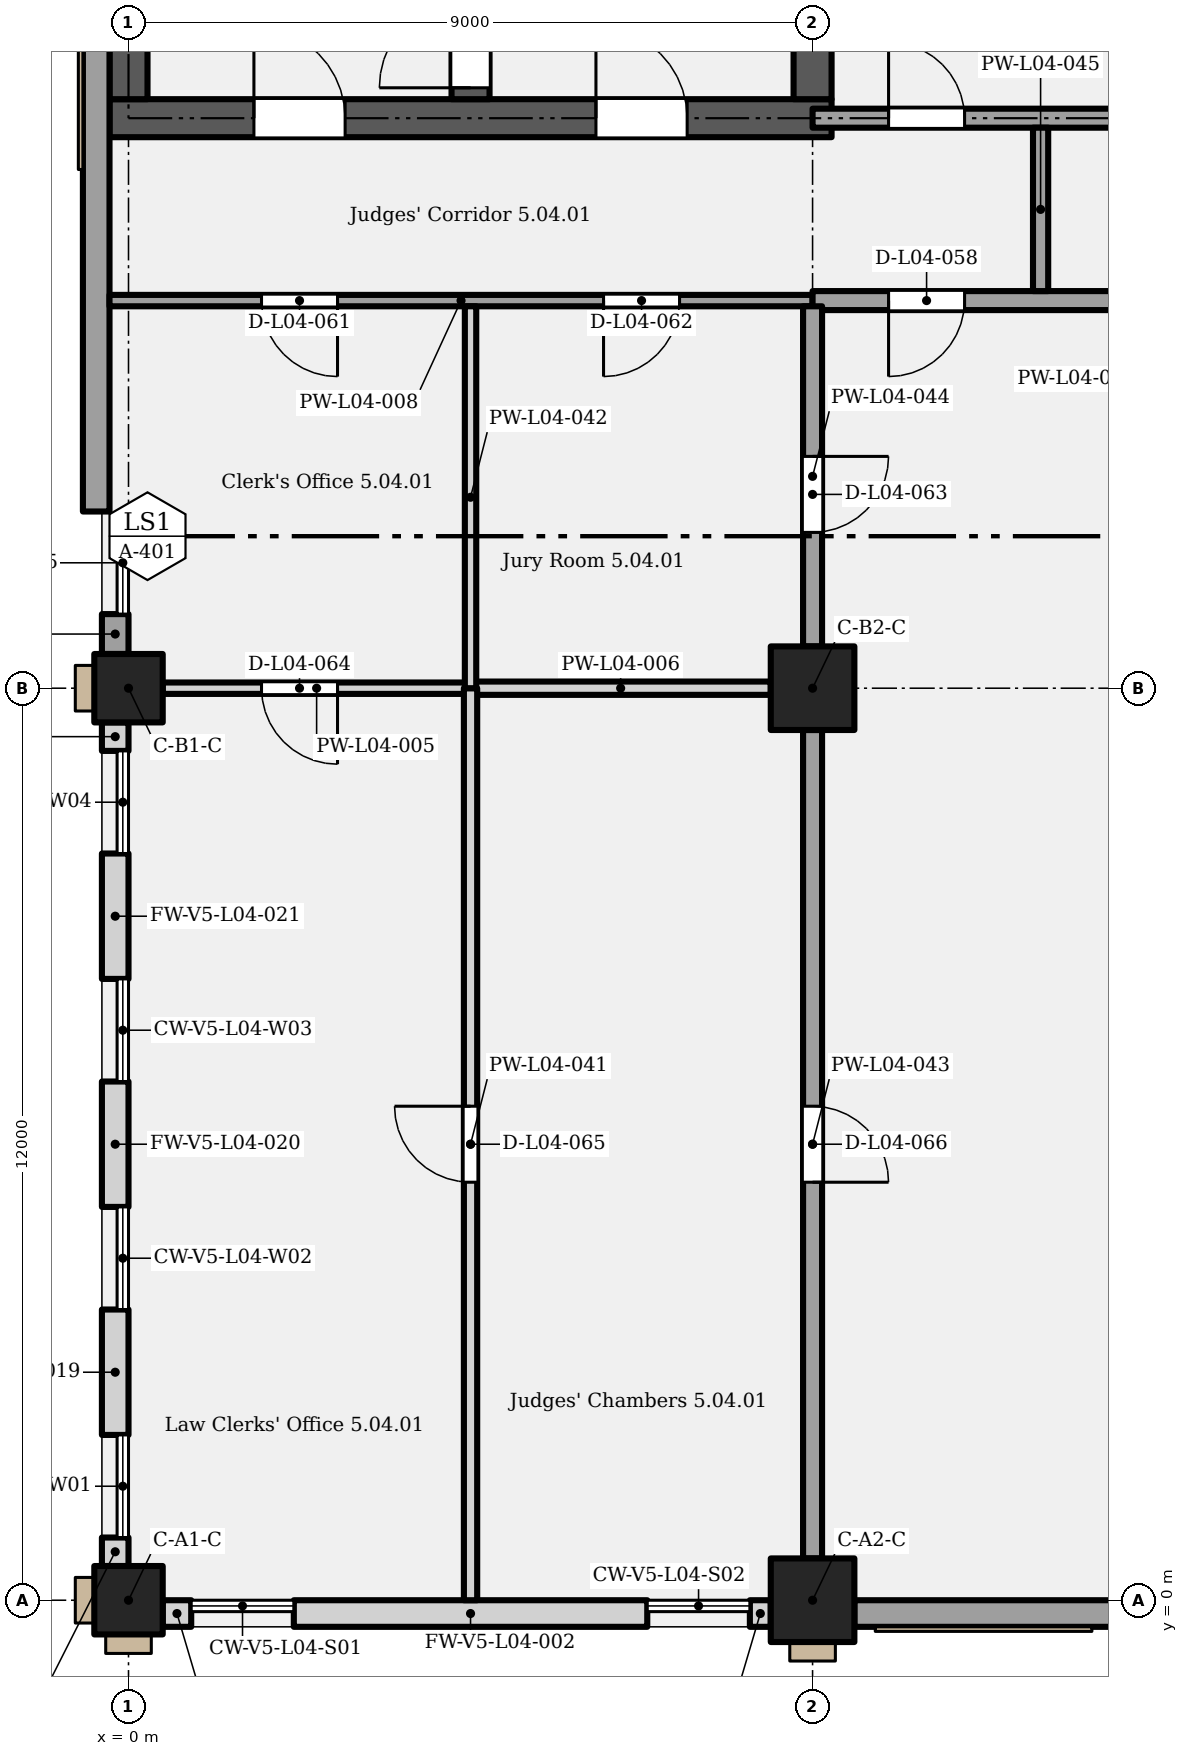
"""IFC4 building model, lengths in metres.
Left out: names, types, materials, properties, quantities, classifications, styles, units other than length and angle.
Written with IfcOpenShell. Run it as: python <this file> out.ifc"""

import sys

from ifc_helpers import new_model, si_unit, direction, frame, frame_2d, origin, origin_with_axes, origin_2d, place, context, subcontext, project, spatial, rectangle, extrude, element, fill, save


model = new_model("IFC4")
c1 = context("Model", 3, precision=1e-05, world=origin(), true_north=direction((0.0, 1.0)))
c2 = subcontext(c1, "Body", "Model", "MODEL_VIEW")
j1 = project(units=[si_unit("LENGTHUNIT", "METRE"), si_unit("PLANEANGLEUNIT", "RADIAN")], contexts=[c1])
p1 = place(None, origin())
s1 = spatial("IfcSite", under=j1, at=p1, CompositionType="ELEMENT")
p2 = place(p1, origin())
s2 = spatial("IfcBuilding", under=s1, at=p2, CompositionType="ELEMENT")
p3 = place(p2, frame((0.0, 0.0, 22.8)))
s3 = spatial("IfcBuildingStorey", under=s2, at=p3, CompositionType="ELEMENT", Elevation=22.8)
p4 = place(p3, origin_with_axes())
e1 = element("IfcColumn", 1, at=p4, inside=s3, PredefinedType="COLUMN", context=c2, shape_type="SweptSolid", body=[
    extrude(rectangle(XDim=0.9, YDim=0.9, at=origin_2d()), origin(), (0.0, 0.0, 1.0), 5.4),
])
p5 = place(p3, frame((9.0, 0.0, 0.0), z_axis=(0.0, 0.0, 1.0), x_axis=(1.0, 0.0, 0.0)))
e2 = element("IfcColumn", 2, at=p5, inside=s3, PredefinedType="COLUMN", context=c2, shape_type="SweptSolid", body=[
    extrude(rectangle(XDim=1.1, YDim=1.1, at=origin_2d()), origin(), (0.0, 0.0, 1.0), 5.4),
])
p6 = place(p3, frame((0.0, 12.0, 0.0), z_axis=(0.0, 0.0, 1.0), x_axis=(1.0, 0.0, 0.0)))
e3 = element("IfcColumn", 3, at=p6, inside=s3, PredefinedType="COLUMN", context=c2, shape_type="SweptSolid", body=[
    extrude(rectangle(XDim=0.9, YDim=0.9, at=origin_2d()), origin(), (0.0, 0.0, 1.0), 5.4),
])
p7 = place(p3, frame((9.0, 12.0, 0.0), z_axis=(0.0, 0.0, 1.0), x_axis=(1.0, 0.0, 0.0)))
e4 = element("IfcColumn", 4, at=p7, inside=s3, PredefinedType="COLUMN", context=c2, shape_type="SweptSolid", body=[
    extrude(rectangle(XDim=1.1, YDim=1.1, at=origin_2d()), origin(), (0.0, 0.0, 1.0), 5.4),
])
p8 = place(p3, frame((-0.25, 19.5, 0.0), z_axis=(0.0, 0.0, 1.0), x_axis=(1.0, 0.0, 0.0)))
e5 = element("IfcWall", 5, at=p8, inside=s3, PredefinedType="SHEAR", context=c2, shape_type="SweptSolid", body=[
    extrude(rectangle(XDim=9.5, YDim=0.5, at=frame_2d((4.75, 0.0))), origin(), (0.0, 0.0, 1.0), 5.15),
])
p9 = place(p8, frame((1.9, 0.0, 0.0)))
e6 = element("IfcOpeningElement", 6, at=p9, cuts=e5, PredefinedType="OPENING", context=c2, shape_type="SweptSolid", body=[
    extrude(rectangle(XDim=1.2, YDim=2.1, at=frame_2d((0.6, 1.05))), frame((0.0, 0.26, 0.0), z_axis=(0.0, -1.0, 0.0), x_axis=(1.0, 0.0, 0.0)), (0.0, 0.0, 1.0), 0.52),
])
p10 = place(p8, frame((6.4, 0.0, 0.0)))
e7 = element("IfcOpeningElement", 7, at=p10, cuts=e5, PredefinedType="OPENING", context=c2, shape_type="SweptSolid", body=[
    extrude(rectangle(XDim=1.2, YDim=2.1, at=frame_2d((0.6, 1.05))), frame((0.0, 0.26, 0.0), z_axis=(0.0, -1.0, 0.0), x_axis=(1.0, 0.0, 0.0)), (0.0, 0.0, 1.0), 0.52),
])
p11 = place(p3, frame((0.0, 19.75, 0.0), z_axis=(0.0, 0.0, 1.0), x_axis=(0.0, 1.0, 0.0)))
e8 = element("IfcWall", 8, at=p11, inside=s3, PredefinedType="SHEAR", context=c2, shape_type="SweptSolid", body=[
    extrude(rectangle(XDim=8.3, YDim=0.5, at=frame_2d((4.15, 0.0))), origin(), (0.0, 0.0, 1.0), 5.15),
])
p12 = place(p3, frame((4.5, 19.75, 0.0), z_axis=(0.0, 0.0, 1.0), x_axis=(0.0, 1.0, 0.0)))
e9 = element("IfcWall", 9, at=p12, inside=s3, PredefinedType="SHEAR", context=c2, shape_type="SweptSolid", body=[
    extrude(rectangle(XDim=8.5, YDim=0.5, at=frame_2d((4.25, 0.0))), origin(), (0.0, 0.0, 1.0), 5.15),
])
p13 = place(p12, frame((0.15, 0.0, 0.0)))
e10 = element("IfcOpeningElement", 10, at=p13, cuts=e9, PredefinedType="OPENING", context=c2, shape_type="SweptSolid", body=[
    extrude(rectangle(XDim=1.2, YDim=2.1, at=frame_2d((0.6, 1.05))), frame((0.0, 0.26, 0.0), z_axis=(0.0, -1.0, 0.0), x_axis=(1.0, 0.0, 0.0)), (0.0, 0.0, 1.0), 0.52),
])
p14 = place(p3, frame((9.0, 19.75, 0.0), z_axis=(0.0, 0.0, 1.0), x_axis=(0.0, 1.0, 0.0)))
e11 = element("IfcWall", 11, at=p14, inside=s3, PredefinedType="SHEAR", context=c2, shape_type="SweptSolid", body=[
    extrude(rectangle(XDim=8.2, YDim=0.5, at=frame_2d((4.1, 0.0))), origin(), (0.0, 0.0, 1.0), 5.15),
])
p15 = place(p3, frame((0.45, -0.175, 0.0), z_axis=(0.0, 0.0, 1.0), x_axis=(1.0, 0.0, 0.0)))
e12 = element("IfcWall", 12, at=p15, inside=s3, PredefinedType="SOLIDWALL", context=c2, shape_type="SweptSolid", body=[
    extrude(rectangle(XDim=0.375, YDim=0.35, at=frame_2d((0.188, 0.0))), origin(), (0.0, 0.0, 1.0), 5.15),
])
p16 = place(p3, frame((2.175, -0.175, 0.0), z_axis=(0.0, 0.0, 1.0), x_axis=(1.0, 0.0, 0.0)))
e13 = element("IfcWall", 13, at=p16, inside=s3, PredefinedType="SOLIDWALL", context=c2, shape_type="SweptSolid", body=[
    extrude(rectangle(XDim=4.65, YDim=0.35, at=frame_2d((2.325, 0.0))), origin(), (0.0, 0.0, 1.0), 5.15),
])
p17 = place(p3, frame((8.175, -0.175, 0.0), z_axis=(0.0, 0.0, 1.0), x_axis=(1.0, 0.0, 0.0)))
e14 = element("IfcWall", 14, at=p17, inside=s3, PredefinedType="SOLIDWALL", context=c2, shape_type="SweptSolid", body=[
    extrude(rectangle(XDim=0.275, YDim=0.35, at=frame_2d((0.137, 0.0))), origin(), (0.0, 0.0, 1.0), 5.15),
])
p18 = place(p3, frame((9.55, -0.175, 0.0), z_axis=(0.0, 0.0, 1.0), x_axis=(1.0, 0.0, 0.0)))
e15 = element("IfcWall", 15, at=p18, inside=s3, PredefinedType="SOLIDWALL", context=c2, shape_type="SweptSolid", body=[
    extrude(rectangle(XDim=7.9, YDim=0.35, at=frame_2d((3.95, 0.0))), origin(), (0.0, 0.0, 1.0), 5.15),
])
p19 = place(p3, frame((-0.175, 0.45, 0.0), z_axis=(0.0, 0.0, 1.0), x_axis=(0.0, 1.0, 0.0)))
e16 = element("IfcWall", 16, at=p19, inside=s3, PredefinedType="SOLIDWALL", context=c2, shape_type="SweptSolid", body=[
    extrude(rectangle(XDim=0.375, YDim=0.35, at=frame_2d((0.188, 0.0))), origin(), (0.0, 0.0, 1.0), 5.15),
])
for number, where, z_axis, x_axis in (
    (17, (-0.175, 2.175, 0.0), (0.0, 0.0, 1.0), (0.0, 1.0, 0.0)),
    (18, (-0.175, 5.175, 0.0), (0.0, 0.0, 1.0), (0.0, 1.0, 0.0)),
    (19, (-0.175, 8.175, 0.0), (0.0, 0.0, 1.0), (0.0, 1.0, 0.0)),
):
    element("IfcWall", number, at=place(p3, frame(where, z_axis=z_axis, x_axis=x_axis)), inside=s3, PredefinedType="SOLIDWALL", context=c2, shape_type="SweptSolid", body=[
        extrude(rectangle(XDim=1.65, YDim=0.35, at=frame_2d((0.825, 0.0))), origin(), (0.0, 0.0, 1.0), 5.15),
    ])
p20 = place(p3, frame((-0.175, 11.175, 0.0), z_axis=(0.0, 0.0, 1.0), x_axis=(0.0, 1.0, 0.0)))
e20 = element("IfcWall", 20, at=p20, inside=s3, PredefinedType="SOLIDWALL", context=c2, shape_type="SweptSolid", body=[
    extrude(rectangle(XDim=0.375, YDim=0.35, at=frame_2d((0.188, 0.0))), origin(), (0.0, 0.0, 1.0), 5.15),
])
p21 = place(p3, frame((-0.175, 12.45, 0.0), z_axis=(0.0, 0.0, 1.0), x_axis=(0.0, 1.0, 0.0)))
e21 = element("IfcWall", 21, at=p21, inside=s3, PredefinedType="SOLIDWALL", context=c2, shape_type="SweptSolid", body=[
    extrude(rectangle(XDim=0.525, YDim=0.35, at=frame_2d((0.263, 0.0))), origin(), (0.0, 0.0, 1.0), 5.15),
])
p22 = place(p3, frame((-0.425, 14.325, 0.0), z_axis=(0.0, 0.0, 1.0), x_axis=(0.0, 1.0, 0.0)))
e22 = element("IfcWall", 22, at=p22, inside=s3, PredefinedType="SOLIDWALL", context=c2, shape_type="SweptSolid", body=[
    extrude(rectangle(XDim=13.725, YDim=0.35, at=frame_2d((6.863, 0.0))), origin(), (0.0, 0.0, 1.0), 5.15),
])
p23 = place(p3, frame((0.45, 12.0, 0.0), z_axis=(0.0, 0.0, 1.0), x_axis=(1.0, 0.0, 0.0)))
e23 = element("IfcWall", 23, at=p23, inside=s3, PredefinedType="PARTITIONING", context=c2, shape_type="SweptSolid", body=[
    extrude(rectangle(XDim=4.05, YDim=0.15, at=frame_2d((2.025, 0.0))), origin(), (0.0, 0.0, 1.0), 4.4),
])
p24 = place(p23, frame((2.3, 0.0, 0.0), z_axis=(0.0, 0.0, 1.0), x_axis=(-1.0, 0.0, 0.0)))
e24 = element("IfcOpeningElement", 24, at=p24, cuts=e23, PredefinedType="OPENING", context=c2, shape_type="SweptSolid", body=[
    extrude(rectangle(XDim=1.0, YDim=2.1, at=frame_2d((0.5, 1.05))), frame((0.0, 0.085, 0.0), z_axis=(0.0, -1.0, 0.0), x_axis=(1.0, 0.0, 0.0)), (0.0, 0.0, 1.0), 0.17),
])
p25 = place(p3, frame((4.5, 12.0, 0.0), z_axis=(0.0, 0.0, 1.0), x_axis=(1.0, 0.0, 0.0)))
e25 = element("IfcWall", 25, at=p25, inside=s3, PredefinedType="PARTITIONING", context=c2, shape_type="SweptSolid", body=[
    extrude(rectangle(XDim=3.95, YDim=0.175, at=frame_2d((1.975, 0.0))), origin(), (0.0, 0.0, 1.0), 4.4),
])
p26 = place(p3, frame((-0.25, 17.1, 0.0), z_axis=(0.0, 0.0, 1.0), x_axis=(1.0, 0.0, 0.0)))
e26 = element("IfcWall", 26, at=p26, inside=s3, PredefinedType="PARTITIONING", context=c2, shape_type="SweptSolid", body=[
    extrude(rectangle(XDim=9.25, YDim=0.15, at=frame_2d((4.625, 0.0))), origin(), (0.0, 0.0, 1.0), 5.15),
])
p27 = place(p26, frame((3.0, 0.0, 0.0), z_axis=(0.0, 0.0, 1.0), x_axis=(-1.0, 0.0, 0.0)))
e27 = element("IfcOpeningElement", 27, at=p27, cuts=e26, PredefinedType="OPENING", context=c2, shape_type="SweptSolid", body=[
    extrude(rectangle(XDim=1.0, YDim=2.1, at=frame_2d((0.5, 1.05))), frame((0.0, 0.085, 0.0), z_axis=(0.0, -1.0, 0.0), x_axis=(1.0, 0.0, 0.0)), (0.0, 0.0, 1.0), 0.17),
])
p28 = place(p26, frame((7.5, 0.0, 0.0), z_axis=(0.0, 0.0, 1.0), x_axis=(-1.0, 0.0, 0.0)))
e28 = element("IfcOpeningElement", 28, at=p28, cuts=e26, PredefinedType="OPENING", context=c2, shape_type="SweptSolid", body=[
    extrude(rectangle(XDim=1.0, YDim=2.1, at=frame_2d((0.5, 1.05))), frame((0.0, 0.085, 0.0), z_axis=(0.0, -1.0, 0.0), x_axis=(1.0, 0.0, 0.0)), (0.0, 0.0, 1.0), 0.17),
])
p29 = place(p3, frame((9.0, 17.1, 0.0), z_axis=(0.0, 0.0, 1.0), x_axis=(1.0, 0.0, 0.0)))
e29 = element("IfcWall", 29, at=p29, inside=s3, PredefinedType="PARTITIONING", context=c2, shape_type="SweptSolid", body=[
    extrude(rectangle(XDim=9.0, YDim=0.25, at=frame_2d((4.5, 0.0))), origin(), (0.0, 0.0, 1.0), 5.15),
])
p30 = place(p29, frame((6.9, 0.0, 0.0), z_axis=(0.0, 0.0, 1.0), x_axis=(-1.0, 0.0, 0.0)))
e30 = element("IfcOpeningElement", 30, at=p30, cuts=e29, PredefinedType="OPENING", context=c2, shape_type="SweptSolid", body=[
    extrude(rectangle(XDim=1.8, YDim=2.4, at=frame_2d((0.9, 1.2))), frame((0.0, 0.135, 0.0), z_axis=(0.0, -1.0, 0.0), x_axis=(1.0, 0.0, 0.0)), (0.0, 0.0, 1.0), 0.27),
])
p31 = place(p29, frame((2.0, 0.0, 0.0), z_axis=(0.0, 0.0, 1.0), x_axis=(-1.0, 0.0, 0.0)))
e31 = element("IfcOpeningElement", 31, at=p31, cuts=e29, PredefinedType="OPENING", context=c2, shape_type="SweptSolid", body=[
    extrude(rectangle(XDim=1.0, YDim=2.1, at=frame_2d((0.5, 1.05))), frame((0.0, 0.135, 0.0), z_axis=(0.0, -1.0, 0.0), x_axis=(1.0, 0.0, 0.0)), (0.0, 0.0, 1.0), 0.27),
])
p32 = place(p3, frame((9.0, 19.5, 0.0), z_axis=(0.0, 0.0, 1.0), x_axis=(1.0, 0.0, 0.0)))
e32 = element("IfcWall", 32, at=p32, inside=s3, PredefinedType="PARTITIONING", context=c2, shape_type="SweptSolid", body=[
    extrude(rectangle(XDim=9.0, YDim=0.25, at=frame_2d((4.5, 0.0))), origin(), (0.0, 0.0, 1.0), 5.15),
])
p33 = place(p32, frame((5.1, 0.0, 0.0)))
e33 = element("IfcOpeningElement", 33, at=p33, cuts=e32, PredefinedType="OPENING", context=c2, shape_type="SweptSolid", body=[
    extrude(rectangle(XDim=1.8, YDim=2.4, at=frame_2d((0.9, 1.2))), frame((0.0, 0.135, 0.0), z_axis=(0.0, -1.0, 0.0), x_axis=(1.0, 0.0, 0.0)), (0.0, 0.0, 1.0), 0.27),
])
p34 = place(p32, frame((1.0, 0.0, 0.0)))
e34 = element("IfcOpeningElement", 34, at=p34, cuts=e32, PredefinedType="OPENING", context=c2, shape_type="SweptSolid", body=[
    extrude(rectangle(XDim=1.0, YDim=2.1, at=frame_2d((0.5, 1.05))), frame((0.0, 0.135, 0.0), z_axis=(0.0, -1.0, 0.0), x_axis=(1.0, 0.0, 0.0)), (0.0, 0.0, 1.0), 0.27),
])
p35 = place(p3, frame((4.5, 0.0, 0.0), z_axis=(0.0, 0.0, 1.0), x_axis=(0.0, 1.0, 0.0)))
e35 = element("IfcWall", 35, at=p35, inside=s3, PredefinedType="PARTITIONING", context=c2, shape_type="SweptSolid", body=[
    extrude(rectangle(XDim=12.0, YDim=0.175, at=frame_2d((6.0, 0.0))), origin(), (0.0, 0.0, 1.0), 5.15),
])
p36 = place(p35, frame((5.5, 0.0, 0.0)))
e36 = element("IfcOpeningElement", 36, at=p36, cuts=e35, PredefinedType="OPENING", context=c2, shape_type="SweptSolid", body=[
    extrude(rectangle(XDim=1.0, YDim=2.1, at=frame_2d((0.5, 1.05))), frame((0.0, 0.097, 0.0), z_axis=(0.0, -1.0, 0.0), x_axis=(1.0, 0.0, 0.0)), (0.0, 0.0, 1.0), 0.195),
])
p37 = place(p3, frame((4.5, 12.0, 0.0), z_axis=(0.0, 0.0, 1.0), x_axis=(0.0, 1.0, 0.0)))
e37 = element("IfcWall", 37, at=p37, inside=s3, PredefinedType="PARTITIONING", context=c2, shape_type="SweptSolid", body=[
    extrude(rectangle(XDim=5.025, YDim=0.15, at=frame_2d((2.512, 0.0))), origin(), (0.0, 0.0, 1.0), 5.15),
])
p38 = place(p3, frame((9.0, 0.55, 0.0), z_axis=(0.0, 0.0, 1.0), x_axis=(0.0, 1.0, 0.0)))
e38 = element("IfcWall", 38, at=p38, inside=s3, PredefinedType="PARTITIONING", context=c2, shape_type="SweptSolid", body=[
    extrude(rectangle(XDim=10.9, YDim=0.25, at=frame_2d((5.45, 0.0))), origin(), (0.0, 0.0, 1.0), 4.4),
])
p39 = place(p38, frame((5.95, 0.0, 0.0), z_axis=(0.0, 0.0, 1.0), x_axis=(-1.0, 0.0, 0.0)))
e39 = element("IfcOpeningElement", 39, at=p39, cuts=e38, PredefinedType="OPENING", context=c2, shape_type="SweptSolid", body=[
    extrude(rectangle(XDim=1.0, YDim=2.1, at=frame_2d((0.5, 1.05))), frame((0.0, 0.135, 0.0), z_axis=(0.0, -1.0, 0.0), x_axis=(1.0, 0.0, 0.0)), (0.0, 0.0, 1.0), 0.27),
])
p40 = place(p3, frame((9.0, 12.55, 0.0), z_axis=(0.0, 0.0, 1.0), x_axis=(0.0, 1.0, 0.0)))
e40 = element("IfcWall", 40, at=p40, inside=s3, PredefinedType="PARTITIONING", context=c2, shape_type="SweptSolid", body=[
    extrude(rectangle(XDim=4.475, YDim=0.25, at=frame_2d((2.237, 0.0))), origin(), (0.0, 0.0, 1.0), 4.2),
])
p41 = place(p40, frame((2.5, 0.0, 0.0), z_axis=(0.0, 0.0, 1.0), x_axis=(-1.0, 0.0, 0.0)))
e41 = element("IfcOpeningElement", 41, at=p41, cuts=e40, PredefinedType="OPENING", context=c2, shape_type="SweptSolid", body=[
    extrude(rectangle(XDim=1.0, YDim=2.1, at=frame_2d((0.5, 1.05))), frame((0.0, 0.135, 0.0), z_axis=(0.0, -1.0, 0.0), x_axis=(1.0, 0.0, 0.0)), (0.0, 0.0, 1.0), 0.27),
])
p42 = place(p3, frame((12.0, 17.225, 0.0), z_axis=(0.0, 0.0, 1.0), x_axis=(0.0, 1.0, 0.0)))
e42 = element("IfcWall", 42, at=p42, inside=s3, PredefinedType="PARTITIONING", context=c2, shape_type="SweptSolid", body=[
    extrude(rectangle(XDim=2.15, YDim=0.2, at=frame_2d((1.075, 0.0))), origin(), (0.0, 0.0, 1.0), 5.15),
])
p43 = place(p9, origin())
e43 = element("IfcDoor", 43, at=p43, inside=s3, OperationType="SINGLE_SWING_LEFT", PredefinedType="DOOR", context=c2, shape_type="SweptSolid", body=[
    extrude(rectangle(XDim=1.2, YDim=2.1, at=frame_2d((0.6, 1.05))), frame((0.0, 0.025, 0.0), z_axis=(0.0, -1.0, 0.0), x_axis=(1.0, 0.0, 0.0)), (0.0, 0.0, 1.0), 0.05),
])
fill(e6, e43)
p44 = place(p13, origin())
e44 = element("IfcDoor", 44, at=p44, inside=s3, OperationType="SINGLE_SWING_LEFT", PredefinedType="DOOR", context=c2, shape_type="SweptSolid", body=[
    extrude(rectangle(XDim=1.2, YDim=2.1, at=frame_2d((0.6, 1.05))), frame((0.0, 0.025, 0.0), z_axis=(0.0, -1.0, 0.0), x_axis=(1.0, 0.0, 0.0)), (0.0, 0.0, 1.0), 0.05),
])
fill(e10, e44)
p45 = place(p10, origin())
e45 = element("IfcDoor", 45, at=p45, inside=s3, OperationType="SINGLE_SWING_LEFT", PredefinedType="DOOR", context=c2, shape_type="SweptSolid", body=[
    extrude(rectangle(XDim=1.2, YDim=2.1, at=frame_2d((0.6, 1.05))), frame((0.0, 0.025, 0.0), z_axis=(0.0, -1.0, 0.0), x_axis=(1.0, 0.0, 0.0)), (0.0, 0.0, 1.0), 0.05),
])
fill(e7, e45)
p46 = place(p31, origin())
e46 = element("IfcDoor", 46, at=p46, inside=s3, OperationType="SINGLE_SWING_RIGHT", PredefinedType="DOOR", context=c2, shape_type="SweptSolid", body=[
    extrude(rectangle(XDim=1.0, YDim=2.1, at=frame_2d((0.5, 1.05))), frame((0.0, 0.025, 0.0), z_axis=(0.0, -1.0, 0.0), x_axis=(1.0, 0.0, 0.0)), (0.0, 0.0, 1.0), 0.05),
])
fill(e31, e46)
p47 = place(p34, origin())
e47 = element("IfcDoor", 47, at=p47, inside=s3, OperationType="SINGLE_SWING_LEFT", PredefinedType="DOOR", context=c2, shape_type="SweptSolid", body=[
    extrude(rectangle(XDim=1.0, YDim=2.1, at=frame_2d((0.5, 1.05))), frame((0.0, 0.025, 0.0), z_axis=(0.0, -1.0, 0.0), x_axis=(1.0, 0.0, 0.0)), (0.0, 0.0, 1.0), 0.05),
])
fill(e34, e47)
p48 = place(p27, origin())
e48 = element("IfcDoor", 48, at=p48, inside=s3, OperationType="SINGLE_SWING_LEFT", PredefinedType="DOOR", context=c2, shape_type="SweptSolid", body=[
    extrude(rectangle(XDim=1.0, YDim=2.1, at=frame_2d((0.5, 1.05))), frame((0.0, 0.025, 0.0), z_axis=(0.0, -1.0, 0.0), x_axis=(1.0, 0.0, 0.0)), (0.0, 0.0, 1.0), 0.05),
])
fill(e27, e48)
p49 = place(p28, origin())
e49 = element("IfcDoor", 49, at=p49, inside=s3, OperationType="SINGLE_SWING_RIGHT", PredefinedType="DOOR", context=c2, shape_type="SweptSolid", body=[
    extrude(rectangle(XDim=1.0, YDim=2.1, at=frame_2d((0.5, 1.05))), frame((0.0, 0.025, 0.0), z_axis=(0.0, -1.0, 0.0), x_axis=(1.0, 0.0, 0.0)), (0.0, 0.0, 1.0), 0.05),
])
fill(e28, e49)
p50 = place(p41, origin())
e50 = element("IfcDoor", 50, at=p50, inside=s3, OperationType="SINGLE_SWING_LEFT", PredefinedType="DOOR", context=c2, shape_type="SweptSolid", body=[
    extrude(rectangle(XDim=1.0, YDim=2.1, at=frame_2d((0.5, 1.05))), frame((0.0, 0.025, 0.0), z_axis=(0.0, -1.0, 0.0), x_axis=(1.0, 0.0, 0.0)), (0.0, 0.0, 1.0), 0.05),
])
fill(e41, e50)
p51 = place(p24, origin())
e51 = element("IfcDoor", 51, at=p51, inside=s3, OperationType="SINGLE_SWING_LEFT", PredefinedType="DOOR", context=c2, shape_type="SweptSolid", body=[
    extrude(rectangle(XDim=1.0, YDim=2.1, at=frame_2d((0.5, 1.05))), frame((0.0, 0.025, 0.0), z_axis=(0.0, -1.0, 0.0), x_axis=(1.0, 0.0, 0.0)), (0.0, 0.0, 1.0), 0.05),
])
fill(e24, e51)
p52 = place(p36, origin())
e52 = element("IfcDoor", 52, at=p52, inside=s3, OperationType="SINGLE_SWING_RIGHT", PredefinedType="DOOR", context=c2, shape_type="SweptSolid", body=[
    extrude(rectangle(XDim=1.0, YDim=2.1, at=frame_2d((0.5, 1.05))), frame((0.0, 0.025, 0.0), z_axis=(0.0, -1.0, 0.0), x_axis=(1.0, 0.0, 0.0)), (0.0, 0.0, 1.0), 0.05),
])
fill(e36, e52)
p53 = place(p39, origin())
e53 = element("IfcDoor", 53, at=p53, inside=s3, OperationType="SINGLE_SWING_RIGHT", PredefinedType="DOOR", context=c2, shape_type="SweptSolid", body=[
    extrude(rectangle(XDim=1.0, YDim=2.1, at=frame_2d((0.5, 1.05))), frame((0.0, 0.025, 0.0), z_axis=(0.0, -1.0, 0.0), x_axis=(1.0, 0.0, 0.0)), (0.0, 0.0, 1.0), 0.05),
])
fill(e39, e53)
save(model, sys.argv[1])
